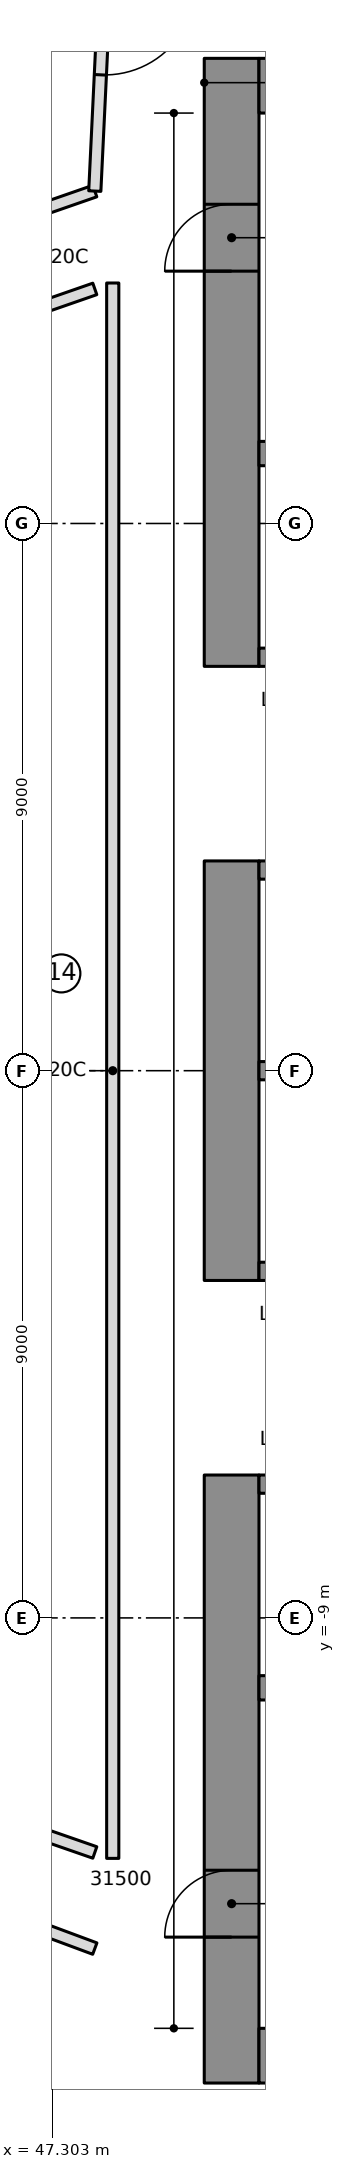
"""IFC4 building model, lengths in metres.
Left out: names, types, materials, properties, quantities, classifications, styles, units other than length and angle.
Written with IfcOpenShell. Run it as: python <this file> out.ifc"""

import sys

from ifc_helpers import new_model, si_unit, direction, frame, frame_2d, origin, place, context, subcontext, project, spatial, rectangle, extrude, element, fill, save


model = new_model("IFC4")
c1 = context("Model", 3, precision=1e-05, world=origin(), true_north=direction((0.0, 1.0)))
c2 = subcontext(c1, "Body", "Model", "MODEL_VIEW")
j1 = project(units=[si_unit("LENGTHUNIT", "METRE"), si_unit("PLANEANGLEUNIT", "RADIAN")], contexts=[c1])
p1 = place(None, origin())
s1 = spatial("IfcSite", under=j1, at=p1, CompositionType="ELEMENT")
p2 = place(p1, origin())
s2 = spatial("IfcBuilding", under=s1, at=p2, CompositionType="ELEMENT")
p3 = place(p2, frame((0.0, 0.0, 147.95)))
s3 = spatial("IfcBuildingStorey", under=s2, at=p3, CompositionType="ELEMENT", Elevation=147.95)
p4 = place(p3, frame((50.25, 6.65, 0.0), z_axis=(0.0, 0.0, 1.0), x_axis=(0.0, 1.0, 0.0)))
e1 = element("IfcWall", 1, at=p4, inside=s3, PredefinedType="SHEAR", context=c2, shape_type="SweptSolid", body=[
    extrude(rectangle(XDim=10.0, YDim=0.9, at=frame_2d((5.0, 0.0))), origin(), (0.0, 0.0, 1.0), 3.55),
])
p5 = place(p4, frame((6.5, 0.0, 0.0)))
e2 = element("IfcOpeningElement", 2, at=p5, cuts=e1, PredefinedType="OPENING", context=c2, shape_type="SweptSolid", body=[
    extrude(rectangle(XDim=1.1, YDim=2.1, at=frame_2d((0.55, 1.05))), frame((0.0, 0.46, 0.0), z_axis=(0.0, -1.0, 0.0), x_axis=(1.0, 0.0, 0.0)), (0.0, 0.0, 1.0), 0.92),
])
p6 = place(p3, frame((50.25, -3.45, 0.0), z_axis=(0.0, 0.0, 1.0), x_axis=(0.0, 1.0, 0.0)))
e3 = element("IfcWall", 3, at=p6, inside=s3, PredefinedType="SHEAR", context=c2, shape_type="SweptSolid", body=[
    extrude(rectangle(XDim=6.9, YDim=0.9, at=frame_2d((3.45, 0.0))), origin(), (0.0, 0.0, 1.0), 3.55),
])
p7 = place(p3, frame((50.25, -16.65, 0.0), z_axis=(0.0, 0.0, 1.0), x_axis=(0.0, 1.0, 0.0)))
e4 = element("IfcWall", 4, at=p7, inside=s3, PredefinedType="SHEAR", context=c2, shape_type="SweptSolid", body=[
    extrude(rectangle(XDim=10.0, YDim=0.9, at=frame_2d((5.0, 0.0))), origin(), (0.0, 0.0, 1.0), 3.55),
])
p8 = place(p7, frame((2.4, 0.0, 0.0)))
e5 = element("IfcOpeningElement", 5, at=p8, cuts=e4, PredefinedType="OPENING", context=c2, shape_type="SweptSolid", body=[
    extrude(rectangle(XDim=1.1, YDim=2.1, at=frame_2d((0.55, 1.05))), frame((0.0, 0.46, 0.0), z_axis=(0.0, -1.0, 0.0), x_axis=(1.0, 0.0, 0.0)), (0.0, 0.0, 1.0), 0.92),
])
for number, where, z_axis, x_axis in (
    (6, (50.7, 16.2, 0.0), (0.0, 0.0, 1.0), (1.0, 0.0, 0.0)),
    (7, (50.7, -16.2, 0.0), (0.0, 0.0, 1.0), (1.0, 0.0, 0.0)),
):
    element("IfcWall", number, at=place(p3, frame(where, z_axis=z_axis, x_axis=x_axis)), inside=s3, PredefinedType="SHEAR", context=c2, shape_type="SweptSolid", body=[
        extrude(rectangle(XDim=13.92, YDim=0.9, at=frame_2d((6.96, 0.0))), origin(), (0.0, 0.0, 1.0), 3.55),
    ])
p9 = place(p3, frame((50.7, 10.15, 0.0), z_axis=(0.0, 0.0, 1.0), x_axis=(1.0, 0.0, 0.0)))
e8 = element("IfcWall", 8, at=p9, inside=s3, PredefinedType="SHEAR", context=c2, shape_type="SweptSolid", body=[
    extrude(rectangle(XDim=13.02, YDim=0.4, at=frame_2d((6.51, 0.0))), origin(), (0.0, 0.0, 1.0), 3.55),
])
p10 = place(p9, frame((0.7, 0.0, 0.0)))
e9 = element("IfcOpeningElement", 9, at=p10, cuts=e8, PredefinedType="OPENING", context=c2, shape_type="SweptSolid", body=[
    extrude(rectangle(XDim=1.1, YDim=2.1, at=frame_2d((0.55, 1.05))), frame((0.0, 0.21, 0.0), z_axis=(0.0, -1.0, 0.0), x_axis=(1.0, 0.0, 0.0)), (0.0, 0.0, 1.0), 0.42),
])
p11 = place(p9, frame((3.5, 0.0, 0.0)))
e10 = element("IfcOpeningElement", 10, at=p11, cuts=e8, PredefinedType="OPENING", context=c2, shape_type="SweptSolid", body=[
    extrude(rectangle(XDim=1.1, YDim=2.1, at=frame_2d((0.55, 1.05))), frame((0.0, 0.21, 0.0), z_axis=(0.0, -1.0, 0.0), x_axis=(1.0, 0.0, 0.0)), (0.0, 0.0, 1.0), 0.42),
])
p12 = place(p3, frame((50.7, -10.15, 0.0), z_axis=(0.0, 0.0, 1.0), x_axis=(1.0, 0.0, 0.0)))
e11 = element("IfcWall", 11, at=p12, inside=s3, PredefinedType="SHEAR", context=c2, shape_type="SweptSolid", body=[
    extrude(rectangle(XDim=13.02, YDim=0.4, at=frame_2d((6.51, 0.0))), origin(), (0.0, 0.0, 1.0), 3.55),
])
p13 = place(p3, frame((50.7, 0.0, 0.0), z_axis=(0.0, 0.0, 1.0), x_axis=(1.0, 0.0, 0.0)))
e12 = element("IfcWall", 12, at=p13, inside=s3, PredefinedType="SHEAR", context=c2, shape_type="SweptSolid", body=[
    extrude(rectangle(XDim=10.9, YDim=0.3, at=frame_2d((5.45, 0.0))), origin(), (0.0, 0.0, 1.0), 3.55),
])
p14 = place(p3, frame((50.7, 3.3, 0.0), z_axis=(0.0, 0.0, 1.0), x_axis=(1.0, 0.0, 0.0)))
e13 = element("IfcWall", 13, at=p14, inside=s3, PredefinedType="SHEAR", context=c2, shape_type="SweptSolid", body=[
    extrude(rectangle(XDim=10.9, YDim=0.3, at=frame_2d((5.45, 0.0))), origin(), (0.0, 0.0, 1.0), 3.55),
])
p15 = place(p14, frame((0.8, 0.0, 0.0)))
e14 = element("IfcOpeningElement", 14, at=p15, cuts=e13, PredefinedType="OPENING", context=c2, shape_type="SweptSolid", body=[
    extrude(rectangle(XDim=0.9, YDim=2.1, at=frame_2d((0.45, 1.05))), frame((0.0, 0.16, 0.0), z_axis=(0.0, -1.0, 0.0), x_axis=(1.0, 0.0, 0.0)), (0.0, 0.0, 1.0), 0.32),
])
p16 = place(p14, frame((3.6, 0.0, 0.0)))
e15 = element("IfcOpeningElement", 15, at=p16, cuts=e13, PredefinedType="OPENING", context=c2, shape_type="SweptSolid", body=[
    extrude(rectangle(XDim=0.9, YDim=2.1, at=frame_2d((0.45, 1.05))), frame((0.0, 0.16, 0.0), z_axis=(0.0, -1.0, 0.0), x_axis=(1.0, 0.0, 0.0)), (0.0, 0.0, 1.0), 0.32),
])
p17 = place(p14, frame((6.4, 0.0, 0.0)))
e16 = element("IfcOpeningElement", 16, at=p17, cuts=e13, PredefinedType="OPENING", context=c2, shape_type="SweptSolid", body=[
    extrude(rectangle(XDim=0.9, YDim=2.1, at=frame_2d((0.45, 1.05))), frame((0.0, 0.16, 0.0), z_axis=(0.0, -1.0, 0.0), x_axis=(1.0, 0.0, 0.0)), (0.0, 0.0, 1.0), 0.32),
])
p18 = place(p14, frame((9.2, 0.0, 0.0)))
e17 = element("IfcOpeningElement", 17, at=p18, cuts=e13, PredefinedType="OPENING", context=c2, shape_type="SweptSolid", body=[
    extrude(rectangle(XDim=0.9, YDim=2.1, at=frame_2d((0.45, 1.05))), frame((0.0, 0.16, 0.0), z_axis=(0.0, -1.0, 0.0), x_axis=(1.0, 0.0, 0.0)), (0.0, 0.0, 1.0), 0.32),
])
p19 = place(p3, frame((50.7, 6.8, 0.0), z_axis=(0.0, 0.0, 1.0), x_axis=(1.0, 0.0, 0.0)))
e18 = element("IfcWall", 18, at=p19, inside=s3, PredefinedType="SHEAR", context=c2, shape_type="SweptSolid", body=[
    extrude(rectangle(XDim=10.9, YDim=0.3, at=frame_2d((5.45, 0.0))), origin(), (0.0, 0.0, 1.0), 3.55),
])
p20 = place(p19, frame((6.3, 0.0, 0.0)))
e19 = element("IfcOpeningElement", 19, at=p20, cuts=e18, PredefinedType="OPENING", context=c2, shape_type="SweptSolid", body=[
    extrude(rectangle(XDim=1.1, YDim=2.1, at=frame_2d((0.55, 1.05))), frame((0.0, 0.16, 0.0), z_axis=(0.0, -1.0, 0.0), x_axis=(1.0, 0.0, 0.0)), (0.0, 0.0, 1.0), 0.32),
])
p21 = place(p19, frame((9.1, 0.0, 0.0)))
e20 = element("IfcOpeningElement", 20, at=p21, cuts=e18, PredefinedType="OPENING", context=c2, shape_type="SweptSolid", body=[
    extrude(rectangle(XDim=1.1, YDim=2.1, at=frame_2d((0.55, 1.05))), frame((0.0, 0.16, 0.0), z_axis=(0.0, -1.0, 0.0), x_axis=(1.0, 0.0, 0.0)), (0.0, 0.0, 1.0), 0.32),
])
p22 = place(p3, frame((50.7, -3.3, 0.0), z_axis=(0.0, 0.0, 1.0), x_axis=(1.0, 0.0, 0.0)))
e21 = element("IfcWall", 21, at=p22, inside=s3, PredefinedType="SHEAR", context=c2, shape_type="SweptSolid", body=[
    extrude(rectangle(XDim=10.9, YDim=0.3, at=frame_2d((5.45, 0.0))), origin(), (0.0, 0.0, 1.0), 3.55),
])
p23 = place(p22, frame((9.2, 0.0, 0.0)))
e22 = element("IfcOpeningElement", 22, at=p23, cuts=e21, PredefinedType="OPENING", context=c2, shape_type="SweptSolid", body=[
    extrude(rectangle(XDim=0.9, YDim=2.1, at=frame_2d((0.45, 1.05))), frame((0.0, 0.16, 0.0), z_axis=(0.0, -1.0, 0.0), x_axis=(1.0, 0.0, 0.0)), (0.0, 0.0, 1.0), 0.32),
])
p24 = place(p3, frame((50.7, -6.8, 0.0), z_axis=(0.0, 0.0, 1.0), x_axis=(1.0, 0.0, 0.0)))
e23 = element("IfcWall", 23, at=p24, inside=s3, PredefinedType="SHEAR", context=c2, shape_type="SweptSolid", body=[
    extrude(rectangle(XDim=10.9, YDim=0.3, at=frame_2d((5.45, 0.0))), origin(), (0.0, 0.0, 1.0), 3.55),
])
p25 = place(p24, frame((0.7, 0.0, 0.0)))
e24 = element("IfcOpeningElement", 24, at=p25, cuts=e23, PredefinedType="OPENING", context=c2, shape_type="SweptSolid", body=[
    extrude(rectangle(XDim=1.1, YDim=2.1, at=frame_2d((0.55, 1.05))), frame((0.0, 0.16, 0.0), z_axis=(0.0, -1.0, 0.0), x_axis=(1.0, 0.0, 0.0)), (0.0, 0.0, 1.0), 0.32),
])
p26 = place(p24, frame((3.5, 0.0, 0.0)))
e25 = element("IfcOpeningElement", 25, at=p26, cuts=e23, PredefinedType="OPENING", context=c2, shape_type="SweptSolid", body=[
    extrude(rectangle(XDim=1.1, YDim=2.1, at=frame_2d((0.55, 1.05))), frame((0.0, 0.16, 0.0), z_axis=(0.0, -1.0, 0.0), x_axis=(1.0, 0.0, 0.0)), (0.0, 0.0, 1.0), 0.32),
])
p27 = place(p24, frame((6.3, 0.0, 0.0)))
e26 = element("IfcOpeningElement", 26, at=p27, cuts=e23, PredefinedType="OPENING", context=c2, shape_type="SweptSolid", body=[
    extrude(rectangle(XDim=1.1, YDim=2.1, at=frame_2d((0.55, 1.05))), frame((0.0, 0.16, 0.0), z_axis=(0.0, -1.0, 0.0), x_axis=(1.0, 0.0, 0.0)), (0.0, 0.0, 1.0), 0.32),
])
p28 = place(p24, frame((9.1, 0.0, 0.0)))
e27 = element("IfcOpeningElement", 27, at=p28, cuts=e23, PredefinedType="OPENING", context=c2, shape_type="SweptSolid", body=[
    extrude(rectangle(XDim=1.1, YDim=2.1, at=frame_2d((0.55, 1.05))), frame((0.0, 0.16, 0.0), z_axis=(0.0, -1.0, 0.0), x_axis=(1.0, 0.0, 0.0)), (0.0, 0.0, 1.0), 0.32),
])
p29 = place(p3, frame((48.0, 14.467, 0.0), z_axis=(0.0, 0.0, 1.0), x_axis=(-0.944566081842, -0.32832136244, 0.0)))
e28 = element("IfcWall", 28, at=p29, inside=s3, PredefinedType="PARTITIONING", context=c2, shape_type="SweptSolid", body=[
    extrude(rectangle(XDim=1.045, YDim=0.2, at=frame_2d((0.523, 0.0))), origin(), (0.0, 0.0, 1.0), 3.25),
])
p30 = place(p3, frame((38.824, -11.028, 0.0), z_axis=(0.0, 0.0, 1.0), x_axis=(0.937322662166, -0.348462662262, 0.0)))
e29 = element("IfcWall", 29, at=p30, inside=s3, PredefinedType="PARTITIONING", context=c2, shape_type="SweptSolid", body=[
    extrude(rectangle(XDim=9.789, YDim=0.2, at=frame_2d((4.895, 0.0))), origin(), (0.0, 0.0, 1.0), 3.25),
])
p31 = place(p30, frame((3.05, 0.0, 0.0)))
e30 = element("IfcOpeningElement", 30, at=p31, cuts=e29, PredefinedType="OPENING", context=c2, shape_type="SweptSolid", body=[
    extrude(rectangle(XDim=1.5, YDim=2.1, at=frame_2d((0.75, 1.05))), frame((0.0, 0.11, 0.0), z_axis=(0.0, -1.0, 0.0), x_axis=(1.0, 0.0, 0.0)), (0.0, 0.0, 1.0), 0.22),
])
for number, where, z_axis, x_axis in (
    (31, (46.781, 12.434, 0.0), (0.0, 0.0, 1.0), (0.945, 0.328, 0.0)),
    (32, (48.0, -12.858, 0.0), (0.0, 0.0, 1.0), (-0.945, 0.328, 0.0)),
):
    element("IfcWall", number, at=place(p3, frame(where, z_axis=z_axis, x_axis=x_axis)), inside=s3, PredefinedType="PARTITIONING", context=c2, shape_type="SweptSolid", body=[
        extrude(rectangle(XDim=1.29, YDim=0.2, at=frame_2d((0.645, 0.0))), origin(), (0.0, 0.0, 1.0), 3.25),
    ])
p32 = place(p3, frame((48.279, 20.289, 0.0), z_axis=(0.0, 0.0, 1.0), x_axis=(-0.047837808481, -0.998855116661, 0.0)))
e33 = element("IfcWall", 33, at=p32, inside=s3, PredefinedType="PARTITIONING", context=c2, shape_type="SweptSolid", body=[
    extrude(rectangle(XDim=5.828, YDim=0.2, at=frame_2d((2.914, 0.0))), origin(), (0.0, 0.0, 1.0), 3.25),
])
p33 = place(p32, frame((2.414, 0.0, 0.0)))
e34 = element("IfcOpeningElement", 34, at=p33, cuts=e33, PredefinedType="OPENING", context=c2, shape_type="SweptSolid", body=[
    extrude(rectangle(XDim=1.5, YDim=2.1, at=frame_2d((0.75, 1.05))), frame((0.0, 0.11, 0.0), z_axis=(0.0, -1.0, 0.0), x_axis=(1.0, 0.0, 0.0)), (0.0, 0.0, 1.0), 0.22),
])
p34 = place(p3, frame((48.295, 12.955, 0.0), z_axis=(0.0, 0.0, 1.0), x_axis=(0.0, -1.0, 0.0)))
e35 = element("IfcWall", 35, at=p34, inside=s3, PredefinedType="PARTITIONING", context=c2, shape_type="SweptSolid", body=[
    extrude(rectangle(XDim=25.91, YDim=0.2, at=frame_2d((12.955, 0.0))), origin(), (0.0, 0.0, 1.0), 3.25),
])
p35 = place(p33, origin())
e36 = element("IfcDoor", 36, at=p35, inside=s3, OperationType="DOUBLE_DOOR_SINGLE_SWING", PredefinedType="DOOR", context=c2, shape_type="SweptSolid", body=[
    extrude(rectangle(XDim=1.5, YDim=2.1, at=frame_2d((0.75, 1.05))), frame((0.0, 0.025, 0.0), z_axis=(0.0, -1.0, 0.0), x_axis=(1.0, 0.0, 0.0)), (0.0, 0.0, 1.0), 0.05),
])
fill(e34, e36)
p36 = place(p5, origin())
e37 = element("IfcDoor", 37, at=p36, inside=s3, OperationType="SINGLE_SWING_RIGHT", PredefinedType="DOOR", context=c2, shape_type="SweptSolid", body=[
    extrude(rectangle(XDim=1.1, YDim=2.1, at=frame_2d((0.55, 1.05))), frame((0.0, 0.025, 0.0), z_axis=(0.0, -1.0, 0.0), x_axis=(1.0, 0.0, 0.0)), (0.0, 0.0, 1.0), 0.05),
])
fill(e2, e37)
p37 = place(p8, origin())
e38 = element("IfcDoor", 38, at=p37, inside=s3, OperationType="SINGLE_SWING_RIGHT", PredefinedType="DOOR", context=c2, shape_type="SweptSolid", body=[
    extrude(rectangle(XDim=1.1, YDim=2.1, at=frame_2d((0.55, 1.05))), frame((0.0, 0.025, 0.0), z_axis=(0.0, -1.0, 0.0), x_axis=(1.0, 0.0, 0.0)), (0.0, 0.0, 1.0), 0.05),
])
fill(e5, e38)
save(model, sys.argv[1])
